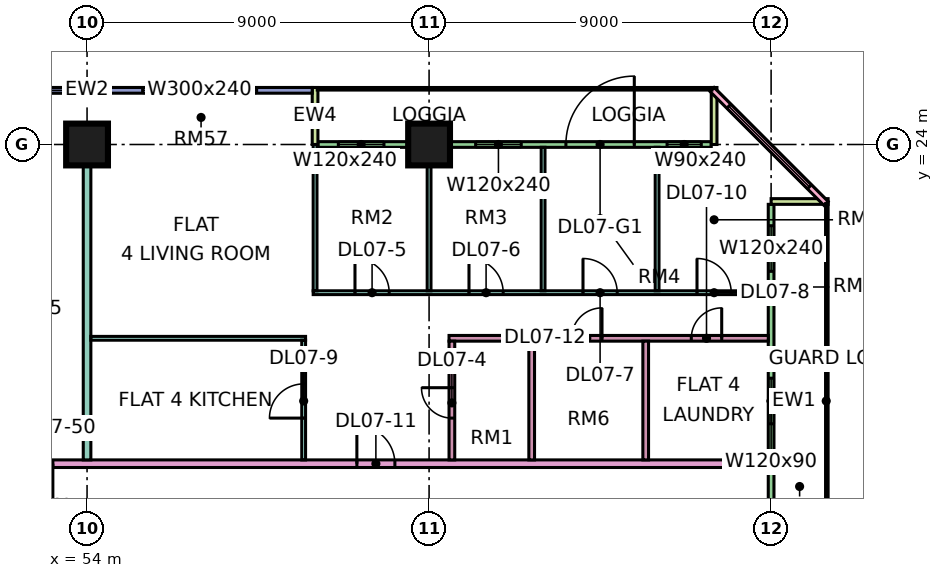
"""IFC4 building model, lengths in metres.
Left out: names, types, materials, properties, quantities, classifications, styles, units other than length and angle.
Written with IfcOpenShell. Run it as: python <this file> out.ifc"""

import sys

from ifc_helpers import new_model, si_unit, direction, frame, frame_2d, origin, origin_2d, place, context, subcontext, project, spatial, rectangle, extrude, element, fill, save


model = new_model("IFC4")
c1 = context("Model", 3, precision=1e-05, world=origin(), true_north=direction((0.0, 1.0)))
c2 = subcontext(c1, "Body", "Model", "MODEL_VIEW")
j1 = project(units=[si_unit("LENGTHUNIT", "METRE"), si_unit("PLANEANGLEUNIT", "RADIAN")], contexts=[c1])
p1 = place(None, origin())
s1 = spatial("IfcSite", under=j1, at=p1, CompositionType="ELEMENT")
p2 = place(p1, origin())
s2 = spatial("IfcBuilding", under=s1, at=p2, CompositionType="ELEMENT")
p3 = place(p2, frame((0.0, 0.0, 41.4)))
s3 = spatial("IfcBuildingStorey", under=s2, at=p3, CompositionType="ELEMENT", Elevation=41.4)
for number, where, z_axis, x_axis in (
    (1, (54.0, 24.0, 0.0), (0.0, 0.0, 1.0), (1.0, 0.0, 0.0)),
    (2, (63.0, 24.0, 0.0), (0.0, 0.0, 1.0), (1.0, 0.0, 0.0)),
):
    element("IfcColumn", number, at=place(p3, frame(where, z_axis=z_axis, x_axis=x_axis)), inside=s3, PredefinedType="COLUMN", context=c2, shape_type="SweptSolid", body=[
        extrude(rectangle(XDim=1.1, YDim=1.1, at=origin_2d()), origin(), (0.0, 0.0, 1.0), 3.75),
    ])
p4 = place(p3, frame((70.425, 24.0, 0.0), z_axis=(0.0, 0.0, 1.0), x_axis=(-1.0, 0.0, 0.0)))
e3 = element("IfcWall", 3, at=p4, inside=s3, PredefinedType="SOLIDWALL", context=c2, shape_type="SweptSolid", body=[
    extrude(rectangle(XDim=10.35, YDim=0.15, at=frame_2d((5.175, 0.0))), origin(), (0.0, 0.0, 1.0), 3.35),
])
p5 = place(p4, frame((0.262, 0.0, 0.45)))
e4 = element("IfcOpeningElement", 4, at=p5, cuts=e3, PredefinedType="OPENING", context=c2, shape_type="SweptSolid", body=[
    extrude(rectangle(XDim=0.9, YDim=2.4, at=frame_2d((0.45, 1.2))), frame((0.0, 0.085, 0.0), z_axis=(0.0, -1.0, 0.0), x_axis=(1.0, 0.0, 0.0)), (0.0, 0.0, 1.0), 0.17),
])
p6 = place(p4, frame((2.025, 0.0, 0.0)))
e5 = element("IfcOpeningElement", 5, at=p6, cuts=e3, PredefinedType="OPENING", context=c2, shape_type="SweptSolid", body=[
    extrude(rectangle(XDim=1.8, YDim=2.4, at=frame_2d((0.9, 1.2))), frame((0.0, 0.085, 0.0), z_axis=(0.0, -1.0, 0.0), x_axis=(1.0, 0.0, 0.0)), (0.0, 0.0, 1.0), 0.17),
])
p7 = place(p4, frame((5.0, 0.0, 0.45)))
e6 = element("IfcOpeningElement", 6, at=p7, cuts=e3, PredefinedType="OPENING", context=c2, shape_type="SweptSolid", body=[
    extrude(rectangle(XDim=1.2, YDim=2.4, at=frame_2d((0.6, 1.2))), frame((0.0, 0.085, 0.0), z_axis=(0.0, -1.0, 0.0), x_axis=(1.0, 0.0, 0.0)), (0.0, 0.0, 1.0), 0.17),
])
p8 = place(p4, frame((8.613, 0.0, 0.45)))
e7 = element("IfcOpeningElement", 7, at=p8, cuts=e3, PredefinedType="OPENING", context=c2, shape_type="SweptSolid", body=[
    extrude(rectangle(XDim=1.2, YDim=2.4, at=frame_2d((0.6, 1.2))), frame((0.0, 0.085, 0.0), z_axis=(0.0, -1.0, 0.0), x_axis=(1.0, 0.0, 0.0)), (0.0, 0.0, 1.0), 0.17),
])
for number, where, z_axis, x_axis in (
    (8, (70.5, 25.5, 0.0), (0.0, 0.0, 1.0), (0.0, -1.0, 0.0)),
    (9, (60.0, 25.5, 0.0), (0.0, 0.0, 1.0), (0.0, -1.0, 0.0)),
):
    element("IfcWall", number, at=place(p3, frame(where, z_axis=z_axis, x_axis=x_axis)), inside=s3, PredefinedType="SOLIDWALL", context=c2, shape_type="SweptSolid", body=[
        extrude(rectangle(XDim=1.5, YDim=0.15, at=frame_2d((0.75, 0.0))), origin(), (0.0, 0.0, 1.0), 3.35),
    ])
p9 = place(p3, frame((59.925, 25.425, 0.0), z_axis=(0.0, 0.0, 1.0), x_axis=(-1.0, 0.0, 0.0)))
e10 = element("IfcWall", 10, at=p9, inside=s3, PredefinedType="SOLIDWALL", context=c2, shape_type="SweptSolid", body=[
    extrude(rectangle(XDim=11.85, YDim=0.15, at=frame_2d((5.925, 0.0))), origin(), (0.0, 0.0, 1.0), 3.35),
])
p10 = place(p9, frame((1.462, 0.0, 0.45)))
e11 = element("IfcOpeningElement", 11, at=p10, cuts=e10, PredefinedType="OPENING", context=c2, shape_type="SweptSolid", body=[
    extrude(rectangle(XDim=3.0, YDim=2.4, at=frame_2d((1.5, 1.2))), frame((0.0, 0.085, 0.0), z_axis=(0.0, -1.0, 0.0), x_axis=(1.0, 0.0, 0.0)), (0.0, 0.0, 1.0), 0.17),
])
p11 = place(p9, frame((6.488, 0.0, 0.45)))
e12 = element("IfcOpeningElement", 12, at=p11, cuts=e10, PredefinedType="OPENING", context=c2, shape_type="SweptSolid", body=[
    extrude(rectangle(XDim=4.8, YDim=2.4, at=frame_2d((2.4, 1.2))), frame((0.0, 0.085, 0.0), z_axis=(0.0, -1.0, 0.0), x_axis=(1.0, 0.0, 0.0)), (0.0, 0.0, 1.0), 0.17),
])
p12 = place(p3, frame((72.0, 12.075, 0.0), z_axis=(0.0, 0.0, 1.0), x_axis=(0.0, 1.0, 0.0)))
e13 = element("IfcWall", 13, at=p12, inside=s3, PredefinedType="SOLIDWALL", context=c2, shape_type="SweptSolid", body=[
    extrude(rectangle(XDim=10.35, YDim=0.15, at=frame_2d((5.175, 0.0))), origin(), (0.0, 0.0, 1.0), 3.35),
])
p13 = place(p12, frame((4.575, 0.0, 1.7)))
e14 = element("IfcOpeningElement", 14, at=p13, cuts=e13, PredefinedType="OPENING", context=c2, shape_type="SweptSolid", body=[
    extrude(rectangle(XDim=1.2, YDim=0.9, at=frame_2d((0.6, 0.45))), frame((0.0, 0.085, 0.0), z_axis=(0.0, -1.0, 0.0), x_axis=(1.0, 0.0, 0.0)), (0.0, 0.0, 1.0), 0.17),
])
p14 = place(p12, frame((8.587, 0.0, 0.45)))
e15 = element("IfcOpeningElement", 15, at=p14, cuts=e13, PredefinedType="OPENING", context=c2, shape_type="SweptSolid", body=[
    extrude(rectangle(XDim=1.2, YDim=2.4, at=frame_2d((0.6, 1.2))), frame((0.0, 0.085, 0.0), z_axis=(0.0, -1.0, 0.0), x_axis=(1.0, 0.0, 0.0)), (0.0, 0.0, 1.0), 0.17),
])
p15 = place(p3, frame((73.5, 22.5, 0.0), z_axis=(0.0, 0.0, 1.0), x_axis=(-1.0, 0.0, 0.0)))
e16 = element("IfcWall", 16, at=p15, inside=s3, PredefinedType="SOLIDWALL", context=c2, shape_type="SweptSolid", body=[
    extrude(rectangle(XDim=1.5, YDim=0.15, at=frame_2d((0.75, 0.0))), origin(), (0.0, 0.0, 1.0), 3.35),
])
p16 = place(p3, frame((73.447, 22.447, 0.0), z_axis=(0.0, 0.0, 1.0), x_axis=(-0.707106781187, 0.707106781187, 0.0)))
e17 = element("IfcWall", 17, at=p16, inside=s3, PredefinedType="SOLIDWALL", context=c2, shape_type="SweptSolid", body=[
    extrude(rectangle(XDim=4.243, YDim=0.15, at=frame_2d((2.121, 0.0))), origin(), (0.0, 0.0, 1.0), 3.35),
])
p17 = place(p16, frame((0.621, 0.0, 0.45)))
e18 = element("IfcOpeningElement", 18, at=p17, cuts=e17, PredefinedType="OPENING", context=c2, shape_type="SweptSolid", body=[
    extrude(rectangle(XDim=3.0, YDim=2.4, at=frame_2d((1.5, 1.2))), frame((0.0, 0.085, 0.0), z_axis=(0.0, -1.0, 0.0), x_axis=(1.0, 0.0, 0.0)), (0.0, 0.0, 1.0), 0.17),
])
p18 = place(p3, frame((51.225, 15.6, 0.0), z_axis=(0.0, 0.0, 1.0), x_axis=(1.0, 0.0, 0.0)))
e19 = element("IfcWall", 19, at=p18, inside=s3, PredefinedType="PARTITIONING", context=c2, shape_type="SweptSolid", body=[
    extrude(rectangle(XDim=20.701, YDim=0.2, at=frame_2d((10.351, 0.0))), origin(), (0.0, 0.0, 1.0), 3.35),
])
p19 = place(p18, frame((9.875, 0.0, 0.0)))
e20 = element("IfcOpeningElement", 20, at=p19, cuts=e19, PredefinedType="OPENING", context=c2, shape_type="SweptSolid", body=[
    extrude(rectangle(XDim=1.0, YDim=2.1, at=frame_2d((0.5, 1.05))), frame((0.0, 0.11, 0.0), z_axis=(0.0, -1.0, 0.0), x_axis=(1.0, 0.0, 0.0)), (0.0, 0.0, 1.0), 0.22),
])
p20 = place(p18, frame((0.875, 0.0, 0.0)))
e21 = element("IfcOpeningElement", 21, at=p20, cuts=e19, PredefinedType="OPENING", context=c2, shape_type="SweptSolid", body=[
    extrude(rectangle(XDim=1.0, YDim=2.1, at=frame_2d((0.5, 1.05))), frame((0.0, 0.11, 0.0), z_axis=(0.0, -1.0, 0.0), x_axis=(1.0, 0.0, 0.0)), (0.0, 0.0, 1.0), 0.22),
])
p21 = place(p3, frame((54.0, 15.7, 0.0), z_axis=(0.0, 0.0, 1.0), x_axis=(0.0, 1.0, 0.0)))
e22 = element("IfcWall", 22, at=p21, inside=s3, PredefinedType="PARTITIONING", context=c2, shape_type="SweptSolid", body=[
    extrude(rectangle(XDim=8.3, YDim=0.2, at=frame_2d((4.15, 0.0))), origin(), (0.0, 0.0, 1.0), 3.35),
])
p22 = place(p3, frame((54.1, 18.9, 0.0), z_axis=(0.0, 0.0, 1.0), x_axis=(1.0, 0.0, 0.0)))
e23 = element("IfcWall", 23, at=p22, inside=s3, PredefinedType="PARTITIONING", context=c2, shape_type="SweptSolid", body=[
    extrude(rectangle(XDim=5.65, YDim=0.1, at=frame_2d((2.825, 0.0))), origin(), (0.0, 0.0, 1.0), 3.35),
])
p23 = place(p3, frame((59.7, 15.7, 0.0), z_axis=(0.0, 0.0, 1.0), x_axis=(0.0, 1.0, 0.0)))
e24 = element("IfcWall", 24, at=p23, inside=s3, PredefinedType="PARTITIONING", context=c2, shape_type="SweptSolid", body=[
    extrude(rectangle(XDim=3.15, YDim=0.1, at=frame_2d((1.575, 0.0))), origin(), (0.0, 0.0, 1.0), 3.35),
])
p24 = place(p23, frame((1.1, 0.0, 0.0)))
e25 = element("IfcOpeningElement", 25, at=p24, cuts=e24, PredefinedType="OPENING", context=c2, shape_type="SweptSolid", body=[
    extrude(rectangle(XDim=0.9, YDim=2.1, at=frame_2d((0.45, 1.05))), frame((0.0, 0.06, 0.0), z_axis=(0.0, -1.0, 0.0), x_axis=(1.0, 0.0, 0.0)), (0.0, 0.0, 1.0), 0.12),
])
p25 = place(p3, frame((59.95, 20.1, 0.0), z_axis=(0.0, 0.0, 1.0), x_axis=(1.0, 0.0, 0.0)))
e26 = element("IfcWall", 26, at=p25, inside=s3, PredefinedType="PARTITIONING", context=c2, shape_type="SweptSolid", body=[
    extrude(rectangle(XDim=11.976, YDim=0.1, at=frame_2d((5.988, 0.0))), origin(), (0.0, 0.0, 1.0), 3.35),
])
p26 = place(p25, frame((1.1, 0.0, 0.0)))
e27 = element("IfcOpeningElement", 27, at=p26, cuts=e26, PredefinedType="OPENING", context=c2, shape_type="SweptSolid", body=[
    extrude(rectangle(XDim=0.9, YDim=2.1, at=frame_2d((0.45, 1.05))), frame((0.0, 0.06, 0.0), z_axis=(0.0, -1.0, 0.0), x_axis=(1.0, 0.0, 0.0)), (0.0, 0.0, 1.0), 0.12),
])
p27 = place(p25, frame((4.1, 0.0, 0.0)))
e28 = element("IfcOpeningElement", 28, at=p27, cuts=e26, PredefinedType="OPENING", context=c2, shape_type="SweptSolid", body=[
    extrude(rectangle(XDim=0.9, YDim=2.1, at=frame_2d((0.45, 1.05))), frame((0.0, 0.06, 0.0), z_axis=(0.0, -1.0, 0.0), x_axis=(1.0, 0.0, 0.0)), (0.0, 0.0, 1.0), 0.12),
])
p28 = place(p25, frame((7.1, 0.0, 0.0)))
e29 = element("IfcOpeningElement", 29, at=p28, cuts=e26, PredefinedType="OPENING", context=c2, shape_type="SweptSolid", body=[
    extrude(rectangle(XDim=0.9, YDim=2.1, at=frame_2d((0.45, 1.05))), frame((0.0, 0.06, 0.0), z_axis=(0.0, -1.0, 0.0), x_axis=(1.0, 0.0, 0.0)), (0.0, 0.0, 1.0), 0.12),
])
p29 = place(p25, frame((10.1, 0.0, 0.0)))
e30 = element("IfcOpeningElement", 30, at=p29, cuts=e26, PredefinedType="OPENING", context=c2, shape_type="SweptSolid", body=[
    extrude(rectangle(XDim=0.9, YDim=2.1, at=frame_2d((0.45, 1.05))), frame((0.0, 0.06, 0.0), z_axis=(0.0, -1.0, 0.0), x_axis=(1.0, 0.0, 0.0)), (0.0, 0.0, 1.0), 0.12),
])
p30 = place(p3, frame((60.0, 20.15, 0.0), z_axis=(0.0, 0.0, 1.0), x_axis=(0.0, 1.0, 0.0)))
e31 = element("IfcWall", 31, at=p30, inside=s3, PredefinedType="PARTITIONING", context=c2, shape_type="SweptSolid", body=[
    extrude(rectangle(XDim=3.85, YDim=0.1, at=frame_2d((1.925, 0.0))), origin(), (0.0, 0.0, 1.0), 3.35),
])
p31 = place(p3, frame((63.0, 20.15, 0.0), z_axis=(0.0, 0.0, 1.0), x_axis=(0.0, 1.0, 0.0)))
e32 = element("IfcWall", 32, at=p31, inside=s3, PredefinedType="PARTITIONING", context=c2, shape_type="SweptSolid", body=[
    extrude(rectangle(XDim=3.776, YDim=0.1, at=frame_2d((1.888, 0.0))), origin(), (0.0, 0.0, 1.0), 3.35),
])
p32 = place(p3, frame((63.525, 18.9, 0.0), z_axis=(0.0, 0.0, 1.0), x_axis=(1.0, 0.0, 0.0)))
e33 = element("IfcWall", 33, at=p32, inside=s3, PredefinedType="PARTITIONING", context=c2, shape_type="SweptSolid", body=[
    extrude(rectangle(XDim=8.401, YDim=0.15, at=frame_2d((4.201, 0.0))), origin(), (0.0, 0.0, 1.0), 3.35),
])
p33 = place(p32, frame((6.375, 0.0, 0.0)))
e34 = element("IfcOpeningElement", 34, at=p33, cuts=e33, PredefinedType="OPENING", context=c2, shape_type="SweptSolid", body=[
    extrude(rectangle(XDim=0.8, YDim=2.1, at=frame_2d((0.4, 1.05))), frame((0.0, 0.085, 0.0), z_axis=(0.0, -1.0, 0.0), x_axis=(1.0, 0.0, 0.0)), (0.0, 0.0, 1.0), 0.17),
])
p34 = place(p32, frame((3.225, 0.0, 0.0)))
e35 = element("IfcOpeningElement", 35, at=p34, cuts=e33, PredefinedType="OPENING", context=c2, shape_type="SweptSolid", body=[
    extrude(rectangle(XDim=0.8, YDim=2.1, at=frame_2d((0.4, 1.05))), frame((0.0, 0.085, 0.0), z_axis=(0.0, -1.0, 0.0), x_axis=(1.0, 0.0, 0.0)), (0.0, 0.0, 1.0), 0.17),
])
p35 = place(p3, frame((63.6, 15.7, 0.0), z_axis=(0.0, 0.0, 1.0), x_axis=(0.0, 1.0, 0.0)))
e36 = element("IfcWall", 36, at=p35, inside=s3, PredefinedType="PARTITIONING", context=c2, shape_type="SweptSolid", body=[
    extrude(rectangle(XDim=3.125, YDim=0.15, at=frame_2d((1.562, 0.0))), origin(), (0.0, 0.0, 1.0), 3.35),
])
p36 = place(p35, frame((1.1, 0.0, 0.0)))
e37 = element("IfcOpeningElement", 37, at=p36, cuts=e36, PredefinedType="OPENING", context=c2, shape_type="SweptSolid", body=[
    extrude(rectangle(XDim=0.8, YDim=2.1, at=frame_2d((0.4, 1.05))), frame((0.0, 0.085, 0.0), z_axis=(0.0, -1.0, 0.0), x_axis=(1.0, 0.0, 0.0)), (0.0, 0.0, 1.0), 0.17),
])
p37 = place(p3, frame((65.7, 15.7, 0.0), z_axis=(0.0, 0.0, 1.0), x_axis=(0.0, 1.0, 0.0)))
e38 = element("IfcWall", 38, at=p37, inside=s3, PredefinedType="PARTITIONING", context=c2, shape_type="SweptSolid", body=[
    extrude(rectangle(XDim=3.125, YDim=0.15, at=frame_2d((1.562, 0.0))), origin(), (0.0, 0.0, 1.0), 3.35),
])
p38 = place(p3, frame((66.0, 20.15, 0.0), z_axis=(0.0, 0.0, 1.0), x_axis=(0.0, 1.0, 0.0)))
e39 = element("IfcWall", 39, at=p38, inside=s3, PredefinedType="PARTITIONING", context=c2, shape_type="SweptSolid", body=[
    extrude(rectangle(XDim=3.776, YDim=0.1, at=frame_2d((1.888, 0.0))), origin(), (0.0, 0.0, 1.0), 3.35),
])
p39 = place(p3, frame((68.7, 15.7, 0.0), z_axis=(0.0, 0.0, 1.0), x_axis=(0.0, 1.0, 0.0)))
e40 = element("IfcWall", 40, at=p39, inside=s3, PredefinedType="PARTITIONING", context=c2, shape_type="SweptSolid", body=[
    extrude(rectangle(XDim=3.125, YDim=0.15, at=frame_2d((1.562, 0.0))), origin(), (0.0, 0.0, 1.0), 3.35),
])
p40 = place(p3, frame((69.0, 20.15, 0.0), z_axis=(0.0, 0.0, 1.0), x_axis=(0.0, 1.0, 0.0)))
e41 = element("IfcWall", 41, at=p40, inside=s3, PredefinedType="PARTITIONING", context=c2, shape_type="SweptSolid", body=[
    extrude(rectangle(XDim=3.776, YDim=0.1, at=frame_2d((1.888, 0.0))), origin(), (0.0, 0.0, 1.0), 3.35),
])
p41 = place(p5, origin())
e42 = element("IfcWindow", 42, at=p41, inside=s3, PartitioningType="SINGLE_PANEL", PredefinedType="WINDOW", context=c2, shape_type="SweptSolid", body=[
    extrude(rectangle(XDim=0.9, YDim=2.4, at=frame_2d((0.45, 1.2))), frame((0.0, 0.03, 0.0), z_axis=(0.0, -1.0, 0.0), x_axis=(1.0, 0.0, 0.0)), (0.0, 0.0, 1.0), 0.06),
])
fill(e4, e42)
p42 = place(p6, frame((1.8, 0.0, 0.0), z_axis=(0.0, 0.0, 1.0), x_axis=(-1.0, 0.0, 0.0)))
e43 = element("IfcDoor", 43, at=p42, inside=s3, OperationType="DOUBLE_DOOR_SINGLE_SWING", PredefinedType="DOOR", context=c2, shape_type="SweptSolid", body=[
    extrude(rectangle(XDim=1.8, YDim=2.4, at=frame_2d((0.9, 1.2))), frame((0.0, 0.025, 0.0), z_axis=(0.0, -1.0, 0.0), x_axis=(1.0, 0.0, 0.0)), (0.0, 0.0, 1.0), 0.05),
])
fill(e5, e43)
p43 = place(p7, origin())
e44 = element("IfcWindow", 44, at=p43, inside=s3, PartitioningType="SINGLE_PANEL", PredefinedType="WINDOW", context=c2, shape_type="SweptSolid", body=[
    extrude(rectangle(XDim=1.2, YDim=2.4, at=frame_2d((0.6, 1.2))), frame((0.0, 0.03, 0.0), z_axis=(0.0, -1.0, 0.0), x_axis=(1.0, 0.0, 0.0)), (0.0, 0.0, 1.0), 0.06),
])
fill(e6, e44)
p44 = place(p8, origin())
e45 = element("IfcWindow", 45, at=p44, inside=s3, PartitioningType="SINGLE_PANEL", PredefinedType="WINDOW", context=c2, shape_type="SweptSolid", body=[
    extrude(rectangle(XDim=1.2, YDim=2.4, at=frame_2d((0.6, 1.2))), frame((0.0, 0.03, 0.0), z_axis=(0.0, -1.0, 0.0), x_axis=(1.0, 0.0, 0.0)), (0.0, 0.0, 1.0), 0.06),
])
fill(e7, e45)
p45 = place(p10, origin())
e46 = element("IfcWindow", 46, at=p45, inside=s3, PartitioningType="SINGLE_PANEL", PredefinedType="WINDOW", context=c2, shape_type="SweptSolid", body=[
    extrude(rectangle(XDim=3.0, YDim=2.4, at=frame_2d((1.5, 1.2))), frame((0.0, 0.03, 0.0), z_axis=(0.0, -1.0, 0.0), x_axis=(1.0, 0.0, 0.0)), (0.0, 0.0, 1.0), 0.06),
])
fill(e11, e46)
p46 = place(p11, origin())
e47 = element("IfcWindow", 47, at=p46, inside=s3, PartitioningType="SINGLE_PANEL", PredefinedType="WINDOW", context=c2, shape_type="SweptSolid", body=[
    extrude(rectangle(XDim=4.8, YDim=2.4, at=frame_2d((2.4, 1.2))), frame((0.0, 0.03, 0.0), z_axis=(0.0, -1.0, 0.0), x_axis=(1.0, 0.0, 0.0)), (0.0, 0.0, 1.0), 0.06),
])
fill(e12, e47)
p47 = place(p13, origin())
e48 = element("IfcWindow", 48, at=p47, inside=s3, PartitioningType="SINGLE_PANEL", PredefinedType="WINDOW", context=c2, shape_type="SweptSolid", body=[
    extrude(rectangle(XDim=1.2, YDim=0.9, at=frame_2d((0.6, 0.45))), frame((0.0, 0.03, 0.0), z_axis=(0.0, -1.0, 0.0), x_axis=(1.0, 0.0, 0.0)), (0.0, 0.0, 1.0), 0.06),
])
fill(e14, e48)
p48 = place(p14, origin())
e49 = element("IfcWindow", 49, at=p48, inside=s3, PartitioningType="SINGLE_PANEL", PredefinedType="WINDOW", context=c2, shape_type="SweptSolid", body=[
    extrude(rectangle(XDim=1.2, YDim=2.4, at=frame_2d((0.6, 1.2))), frame((0.0, 0.03, 0.0), z_axis=(0.0, -1.0, 0.0), x_axis=(1.0, 0.0, 0.0)), (0.0, 0.0, 1.0), 0.06),
])
fill(e15, e49)
p49 = place(p17, origin())
e50 = element("IfcWindow", 50, at=p49, inside=s3, PartitioningType="SINGLE_PANEL", PredefinedType="WINDOW", context=c2, shape_type="SweptSolid", body=[
    extrude(rectangle(XDim=3.0, YDim=2.4, at=frame_2d((1.5, 1.2))), frame((0.0, 0.03, 0.0), z_axis=(0.0, -1.0, 0.0), x_axis=(1.0, 0.0, 0.0)), (0.0, 0.0, 1.0), 0.06),
])
fill(e18, e50)
p50 = place(p36, frame((0.8, 0.0, 0.0), z_axis=(0.0, 0.0, 1.0), x_axis=(-1.0, 0.0, 0.0)))
e51 = element("IfcDoor", 51, at=p50, inside=s3, OperationType="SINGLE_SWING_RIGHT", PredefinedType="DOOR", context=c2, shape_type="SweptSolid", body=[
    extrude(rectangle(XDim=0.8, YDim=2.1, at=frame_2d((0.4, 1.05))), frame((0.0, 0.025, 0.0), z_axis=(0.0, -1.0, 0.0), x_axis=(1.0, 0.0, 0.0)), (0.0, 0.0, 1.0), 0.05),
])
fill(e37, e51)
p51 = place(p26, origin())
e52 = element("IfcDoor", 52, at=p51, inside=s3, OperationType="SINGLE_SWING_LEFT", PredefinedType="DOOR", context=c2, shape_type="SweptSolid", body=[
    extrude(rectangle(XDim=0.9, YDim=2.1, at=frame_2d((0.45, 1.05))), frame((0.0, 0.025, 0.0), z_axis=(0.0, -1.0, 0.0), x_axis=(1.0, 0.0, 0.0)), (0.0, 0.0, 1.0), 0.05),
])
fill(e27, e52)
p52 = place(p27, origin())
e53 = element("IfcDoor", 53, at=p52, inside=s3, OperationType="SINGLE_SWING_LEFT", PredefinedType="DOOR", context=c2, shape_type="SweptSolid", body=[
    extrude(rectangle(XDim=0.9, YDim=2.1, at=frame_2d((0.45, 1.05))), frame((0.0, 0.025, 0.0), z_axis=(0.0, -1.0, 0.0), x_axis=(1.0, 0.0, 0.0)), (0.0, 0.0, 1.0), 0.05),
])
fill(e28, e53)
p53 = place(p28, origin())
e54 = element("IfcDoor", 54, at=p53, inside=s3, OperationType="SINGLE_SWING_LEFT", PredefinedType="DOOR", context=c2, shape_type="SweptSolid", body=[
    extrude(rectangle(XDim=0.9, YDim=2.1, at=frame_2d((0.45, 1.05))), frame((0.0, 0.025, 0.0), z_axis=(0.0, -1.0, 0.0), x_axis=(1.0, 0.0, 0.0)), (0.0, 0.0, 1.0), 0.05),
])
fill(e29, e54)
p54 = place(p29, origin())
e55 = element("IfcDoor", 55, at=p54, inside=s3, OperationType="SINGLE_SWING_LEFT", PredefinedType="DOOR", context=c2, shape_type="SweptSolid", body=[
    extrude(rectangle(XDim=0.9, YDim=2.1, at=frame_2d((0.45, 1.05))), frame((0.0, 0.025, 0.0), z_axis=(0.0, -1.0, 0.0), x_axis=(1.0, 0.0, 0.0)), (0.0, 0.0, 1.0), 0.05),
])
fill(e30, e55)
p55 = place(p24, origin())
e56 = element("IfcDoor", 56, at=p55, inside=s3, OperationType="SINGLE_SWING_LEFT", PredefinedType="DOOR", context=c2, shape_type="SweptSolid", body=[
    extrude(rectangle(XDim=0.9, YDim=2.1, at=frame_2d((0.45, 1.05))), frame((0.0, 0.025, 0.0), z_axis=(0.0, -1.0, 0.0), x_axis=(1.0, 0.0, 0.0)), (0.0, 0.0, 1.0), 0.05),
])
fill(e25, e56)
p56 = place(p33, frame((0.8, 0.0, 0.0), z_axis=(0.0, 0.0, 1.0), x_axis=(-1.0, 0.0, 0.0)))
e57 = element("IfcDoor", 57, at=p56, inside=s3, OperationType="SINGLE_SWING_RIGHT", PredefinedType="DOOR", context=c2, shape_type="SweptSolid", body=[
    extrude(rectangle(XDim=0.8, YDim=2.1, at=frame_2d((0.4, 1.05))), frame((0.0, 0.025, 0.0), z_axis=(0.0, -1.0, 0.0), x_axis=(1.0, 0.0, 0.0)), (0.0, 0.0, 1.0), 0.05),
])
fill(e34, e57)
p57 = place(p19, origin())
e58 = element("IfcDoor", 58, at=p57, inside=s3, OperationType="SINGLE_SWING_LEFT", PredefinedType="DOOR", context=c2, shape_type="SweptSolid", body=[
    extrude(rectangle(XDim=1.0, YDim=2.1, at=frame_2d((0.5, 1.05))), frame((0.0, 0.025, 0.0), z_axis=(0.0, -1.0, 0.0), x_axis=(1.0, 0.0, 0.0)), (0.0, 0.0, 1.0), 0.05),
])
fill(e20, e58)
p58 = place(p34, frame((0.8, 0.0, 0.0), z_axis=(0.0, 0.0, 1.0), x_axis=(-1.0, 0.0, 0.0)))
e59 = element("IfcDoor", 59, at=p58, inside=s3, OperationType="SINGLE_SWING_RIGHT", PredefinedType="DOOR", context=c2, shape_type="SweptSolid", body=[
    extrude(rectangle(XDim=0.8, YDim=2.1, at=frame_2d((0.4, 1.05))), frame((0.0, 0.025, 0.0), z_axis=(0.0, -1.0, 0.0), x_axis=(1.0, 0.0, 0.0)), (0.0, 0.0, 1.0), 0.05),
])
fill(e35, e59)
p59 = place(p20, origin())
e60 = element("IfcDoor", 60, at=p59, inside=s3, OperationType="SINGLE_SWING_RIGHT", PredefinedType="DOOR", context=c2, shape_type="SweptSolid", body=[
    extrude(rectangle(XDim=1.0, YDim=2.1, at=frame_2d((0.5, 1.05))), frame((0.0, 0.025, 0.0), z_axis=(0.0, -1.0, 0.0), x_axis=(1.0, 0.0, 0.0)), (0.0, 0.0, 1.0), 0.05),
])
fill(e21, e60)
save(model, sys.argv[1])
